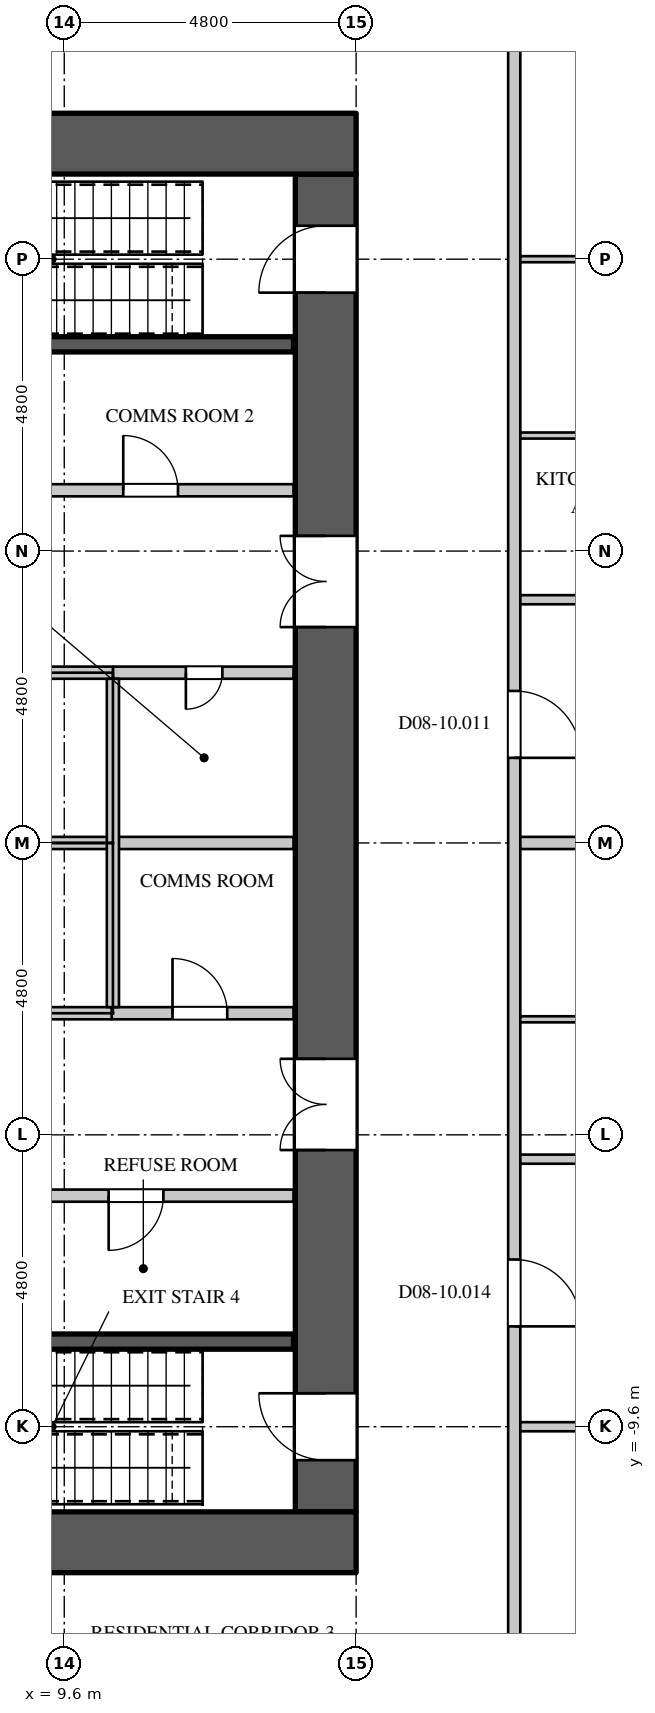
"""IFC4 building model, lengths in metres.
Left out: names, types, materials, properties, quantities, classifications, styles, units other than length and angle.
Written with IfcOpenShell. Run it as: python <this file> out.ifc"""

import sys

from ifc_helpers import new_model, si_unit, direction, frame, frame_2d, origin, place, context, subcontext, project, spatial, rectangle, extrude, element, fill, save


model = new_model("IFC4")
c1 = context("Model", 3, precision=1e-05, world=origin(), true_north=direction((0.0, 1.0)))
c2 = subcontext(c1, "Body", "Model", "MODEL_VIEW")
j1 = project(units=[si_unit("LENGTHUNIT", "METRE"), si_unit("PLANEANGLEUNIT", "RADIAN")], contexts=[c1])
p1 = place(None, origin())
s1 = spatial("IfcSite", under=j1, at=p1, CompositionType="ELEMENT")
p2 = place(p1, origin())
s2 = spatial("IfcBuilding", under=s1, at=p2, CompositionType="ELEMENT")
p3 = place(p2, frame((0.0, 0.0, 38.1)))
s3 = spatial("IfcBuildingStorey", under=s2, at=p3, CompositionType="ELEMENT", Elevation=38.1)
for number, where, z_axis, x_axis in (
    (1, (-14.4, 11.5, 0.0), (0.0, 0.0, 1.0), (1.0, 0.0, 0.0)),
    (2, (-14.4, -11.5, 0.0), (0.0, 0.0, 1.0), (1.0, 0.0, 0.0)),
):
    element("IfcWall", number, at=place(p3, frame(where, z_axis=z_axis, x_axis=x_axis)), inside=s3, PredefinedType="SHEAR", context=c2, shape_type="SweptSolid", body=[
        extrude(rectangle(XDim=28.8, YDim=1.0, at=frame_2d((14.4, 0.0))), origin(), (0.0, 0.0, 1.0), 4.2),
    ])
p4 = place(p3, frame((13.9, -11.0, 0.0), z_axis=(0.0, 0.0, 1.0), x_axis=(0.0, 1.0, 0.0)))
e3 = element("IfcWall", 3, at=p4, inside=s3, PredefinedType="SHEAR", context=c2, shape_type="SweptSolid", body=[
    extrude(rectangle(XDim=22.0, YDim=1.0, at=frame_2d((11.0, 0.0))), origin(), (0.0, 0.0, 1.0), 4.2),
])
p5 = place(p4, frame((20.05, 0.0, 0.0)))
e4 = element("IfcOpeningElement", 4, at=p5, cuts=e3, PredefinedType="OPENING", context=c2, shape_type="SweptSolid", body=[
    extrude(rectangle(XDim=1.1, YDim=2.2, at=frame_2d((0.55, 1.1))), frame((0.0, 0.51, 0.0), z_axis=(0.0, -1.0, 0.0), x_axis=(1.0, 0.0, 0.0)), (0.0, 0.0, 1.0), 1.02),
])
p6 = place(p4, frame((0.85, 0.0, 0.0)))
e5 = element("IfcOpeningElement", 5, at=p6, cuts=e3, PredefinedType="OPENING", context=c2, shape_type="SweptSolid", body=[
    extrude(rectangle(XDim=1.1, YDim=2.2, at=frame_2d((0.55, 1.1))), frame((0.0, 0.51, 0.0), z_axis=(0.0, -1.0, 0.0), x_axis=(1.0, 0.0, 0.0)), (0.0, 0.0, 1.0), 1.02),
])
p7 = place(p4, frame((14.55, 0.0, 0.0)))
e6 = element("IfcOpeningElement", 6, at=p7, cuts=e3, PredefinedType="OPENING", context=c2, shape_type="SweptSolid", body=[
    extrude(rectangle(XDim=1.5, YDim=2.4, at=frame_2d((0.75, 1.2))), frame((0.0, 0.51, 0.0), z_axis=(0.0, -1.0, 0.0), x_axis=(1.0, 0.0, 0.0)), (0.0, 0.0, 1.0), 1.02),
])
p8 = place(p4, frame((5.95, 0.0, 0.0)))
e7 = element("IfcOpeningElement", 7, at=p8, cuts=e3, PredefinedType="OPENING", context=c2, shape_type="SweptSolid", body=[
    extrude(rectangle(XDim=1.5, YDim=2.4, at=frame_2d((0.75, 1.2))), frame((0.0, 0.51, 0.0), z_axis=(0.0, -1.0, 0.0), x_axis=(1.0, 0.0, 0.0)), (0.0, 0.0, 1.0), 1.02),
])
p9 = place(p3, frame((-2.22, -5.8, 0.0), z_axis=(0.0, 0.0, 1.0), x_axis=(1.0, 0.0, 0.0)))
e8 = element("IfcWall", 8, at=p9, inside=s3, PredefinedType="PARTITIONING", context=c2, shape_type="SweptSolid", body=[
    extrude(rectangle(XDim=15.59, YDim=0.2, at=frame_2d((7.795, 0.0))), origin(), (0.0, 0.0, 1.0), 3.95),
])
p10 = place(p9, frame((3.05, 0.0, 0.0)))
e9 = element("IfcOpeningElement", 9, at=p10, cuts=e8, PredefinedType="OPENING", context=c2, shape_type="SweptSolid", body=[
    extrude(rectangle(XDim=0.9, YDim=2.2, at=frame_2d((0.45, 1.1))), frame((0.0, 0.11, 0.0), z_axis=(0.0, -1.0, 0.0), x_axis=(1.0, 0.0, 0.0)), (0.0, 0.0, 1.0), 0.22),
])
p11 = place(p9, frame((8.25, 0.0, 0.0)))
e10 = element("IfcOpeningElement", 10, at=p11, cuts=e8, PredefinedType="OPENING", context=c2, shape_type="SweptSolid", body=[
    extrude(rectangle(XDim=0.9, YDim=2.2, at=frame_2d((0.45, 1.1))), frame((0.0, 0.11, 0.0), z_axis=(0.0, -1.0, 0.0), x_axis=(1.0, 0.0, 0.0)), (0.0, 0.0, 1.0), 0.22),
])
p12 = place(p9, frame((12.55, 0.0, 0.0)))
e11 = element("IfcOpeningElement", 11, at=p12, cuts=e8, PredefinedType="OPENING", context=c2, shape_type="SweptSolid", body=[
    extrude(rectangle(XDim=0.9, YDim=2.2, at=frame_2d((0.45, 1.1))), frame((0.0, 0.11, 0.0), z_axis=(0.0, -1.0, 0.0), x_axis=(1.0, 0.0, 0.0)), (0.0, 0.0, 1.0), 0.22),
])
p13 = place(p3, frame((17.0, -14.5, 0.0), z_axis=(0.0, 0.0, 1.0), x_axis=(0.0, 1.0, 0.0)))
e12 = element("IfcWall", 12, at=p13, inside=s3, PredefinedType="PARTITIONING", context=c2, shape_type="SweptSolid", body=[
    extrude(rectangle(XDim=29.0, YDim=0.2, at=frame_2d((14.5, 0.0))), origin(), (0.0, 0.0, 1.0), 3.95),
])
p14 = place(p13, frame((15.9, 0.0, 0.0)))
e13 = element("IfcOpeningElement", 13, at=p14, cuts=e12, PredefinedType="OPENING", context=c2, shape_type="SweptSolid", body=[
    extrude(rectangle(XDim=1.1, YDim=2.4, at=frame_2d((0.55, 1.2))), frame((0.0, 0.11, 0.0), z_axis=(0.0, -1.0, 0.0), x_axis=(1.0, 0.0, 0.0)), (0.0, 0.0, 1.0), 0.22),
])
p15 = place(p13, frame((6.55, 0.0, 0.0)))
e14 = element("IfcOpeningElement", 14, at=p15, cuts=e12, PredefinedType="OPENING", context=c2, shape_type="SweptSolid", body=[
    extrude(rectangle(XDim=1.1, YDim=2.4, at=frame_2d((0.55, 1.2))), frame((0.0, 0.11, 0.0), z_axis=(0.0, -1.0, 0.0), x_axis=(1.0, 0.0, 0.0)), (0.0, 0.0, 1.0), 0.22),
])
p16 = place(p3, frame((16.02, -18.695, 0.0), z_axis=(0.0, 0.0, 1.0), x_axis=(0.707106781187, 0.707106781187, 0.0)))
e15 = element("IfcWall", 15, at=p16, inside=s3, PredefinedType="PARTITIONING", context=c2, shape_type="SweptSolid", body=[
    extrude(rectangle(XDim=9.663, YDim=0.15, at=frame_2d((4.832, 0.0))), origin(), (0.0, 0.0, 1.0), 3.95),
])
p17 = place(p16, frame((4.1, 0.0, 0.0)))
e16 = element("IfcOpeningElement", 16, at=p17, cuts=e15, PredefinedType="OPENING", context=c2, shape_type="SweptSolid", body=[
    extrude(rectangle(XDim=0.95, YDim=2.2, at=frame_2d((0.475, 1.1))), frame((0.0, 0.085, 0.0), z_axis=(0.0, -1.0, 0.0), x_axis=(1.0, 0.0, 0.0)), (0.0, 0.0, 1.0), 0.17),
])
p18 = place(p3, frame((17.1, -9.6, 0.0), z_axis=(0.0, 0.0, 1.0), x_axis=(1.0, 0.0, 0.0)))
e17 = element("IfcWall", 17, at=p18, inside=s3, PredefinedType="PARTITIONING", context=c2, shape_type="SweptSolid", body=[
    extrude(rectangle(XDim=11.755, YDim=0.15, at=frame_2d((5.877, 0.0))), origin(), (0.0, 0.0, 1.0), 3.95),
])
p19 = place(p18, frame((1.8, 0.0, 0.0)))
e18 = element("IfcOpeningElement", 18, at=p19, cuts=e17, PredefinedType="OPENING", context=c2, shape_type="SweptSolid", body=[
    extrude(rectangle(XDim=0.95, YDim=2.2, at=frame_2d((0.475, 1.1))), frame((0.0, 0.085, 0.0), z_axis=(0.0, -1.0, 0.0), x_axis=(1.0, 0.0, 0.0)), (0.0, 0.0, 1.0), 0.17),
])
p20 = place(p18, frame((7.95, 0.0, 0.0)))
e19 = element("IfcOpeningElement", 19, at=p20, cuts=e17, PredefinedType="OPENING", context=c2, shape_type="SweptSolid", body=[
    extrude(rectangle(XDim=1.5, YDim=2.2, at=frame_2d((0.75, 1.1))), frame((0.0, 0.085, 0.0), z_axis=(0.0, -1.0, 0.0), x_axis=(1.0, 0.0, 0.0)), (0.0, 0.0, 1.0), 0.17),
])
p21 = place(p3, frame((17.1, -5.2, 0.0), z_axis=(0.0, 0.0, 1.0), x_axis=(1.0, 0.0, 0.0)))
e20 = element("IfcWall", 20, at=p21, inside=s3, PredefinedType="PARTITIONING", context=c2, shape_type="SweptSolid", body=[
    extrude(rectangle(XDim=4.625, YDim=0.15, at=frame_2d((2.312, 0.0))), origin(), (0.0, 0.0, 1.0), 3.95),
])
p22 = place(p21, frame((1.85, 0.0, 0.0)))
e21 = element("IfcOpeningElement", 21, at=p22, cuts=e20, PredefinedType="OPENING", context=c2, shape_type="SweptSolid", body=[
    extrude(rectangle(XDim=0.95, YDim=2.2, at=frame_2d((0.475, 1.1))), frame((0.0, 0.085, 0.0), z_axis=(0.0, -1.0, 0.0), x_axis=(1.0, 0.0, 0.0)), (0.0, 0.0, 1.0), 0.17),
])
p23 = place(p3, frame((17.1, 4.0, 0.0), z_axis=(0.0, 0.0, 1.0), x_axis=(1.0, 0.0, 0.0)))
e22 = element("IfcWall", 22, at=p23, inside=s3, PredefinedType="PARTITIONING", context=c2, shape_type="SweptSolid", body=[
    extrude(rectangle(XDim=4.625, YDim=0.15, at=frame_2d((2.312, 0.0))), origin(), (0.0, 0.0, 1.0), 3.95),
])
p24 = place(p23, frame((1.85, 0.0, 0.0)))
e23 = element("IfcOpeningElement", 23, at=p24, cuts=e22, PredefinedType="OPENING", context=c2, shape_type="SweptSolid", body=[
    extrude(rectangle(XDim=0.95, YDim=2.2, at=frame_2d((0.475, 1.1))), frame((0.0, 0.085, 0.0), z_axis=(0.0, -1.0, 0.0), x_axis=(1.0, 0.0, 0.0)), (0.0, 0.0, 1.0), 0.17),
])
p25 = place(p3, frame((17.1, 0.0, 0.0), z_axis=(0.0, 0.0, 1.0), x_axis=(1.0, 0.0, 0.0)))
e24 = element("IfcWall", 24, at=p25, inside=s3, PredefinedType="PARTITIONING", context=c2, shape_type="SweptSolid", body=[
    extrude(rectangle(XDim=11.755, YDim=0.2, at=frame_2d((5.877, 0.0))), origin(), (0.0, 0.0, 1.0), 3.95),
])
p26 = place(p3, frame((8.62, 5.8, 0.0), z_axis=(0.0, 0.0, 1.0), x_axis=(1.0, 0.0, 0.0)))
e25 = element("IfcWall", 25, at=p26, inside=s3, PredefinedType="PARTITIONING", context=c2, shape_type="SweptSolid", body=[
    extrude(rectangle(XDim=4.75, YDim=0.2, at=frame_2d((2.375, 0.0))), origin(), (0.0, 0.0, 1.0), 3.95),
])
p27 = place(p26, frame((1.95, 0.0, 0.0)))
e26 = element("IfcOpeningElement", 26, at=p27, cuts=e25, PredefinedType="OPENING", context=c2, shape_type="SweptSolid", body=[
    extrude(rectangle(XDim=0.9, YDim=2.2, at=frame_2d((0.45, 1.1))), frame((0.0, 0.11, 0.0), z_axis=(0.0, -1.0, 0.0), x_axis=(1.0, 0.0, 0.0)), (0.0, 0.0, 1.0), 0.22),
])
p28 = place(p3, frame((10.38, -2.8, 0.0), z_axis=(0.0, 0.0, 1.0), x_axis=(1.0, 0.0, 0.0)))
e27 = element("IfcWall", 27, at=p28, inside=s3, PredefinedType="PARTITIONING", context=c2, shape_type="SweptSolid", body=[
    extrude(rectangle(XDim=2.99, YDim=0.2, at=frame_2d((1.495, 0.0))), origin(), (0.0, 0.0, 1.0), 3.95),
])
p29 = place(p28, frame((1.0, 0.0, 0.0)))
e28 = element("IfcOpeningElement", 28, at=p29, cuts=e27, PredefinedType="OPENING", context=c2, shape_type="SweptSolid", body=[
    extrude(rectangle(XDim=0.9, YDim=2.2, at=frame_2d((0.45, 1.1))), frame((0.0, 0.11, 0.0), z_axis=(0.0, -1.0, 0.0), x_axis=(1.0, 0.0, 0.0)), (0.0, 0.0, 1.0), 0.22),
])
p30 = place(p3, frame((10.4, 2.8, 0.0), z_axis=(0.0, 0.0, 1.0), x_axis=(1.0, 0.0, 0.0)))
e29 = element("IfcWall", 29, at=p30, inside=s3, PredefinedType="PARTITIONING", context=c2, shape_type="SweptSolid", body=[
    extrude(rectangle(XDim=2.97, YDim=0.2, at=frame_2d((1.485, 0.0))), origin(), (0.0, 0.0, 1.0), 3.95),
])
p31 = place(p30, frame((1.2, 0.0, 0.0)))
e30 = element("IfcOpeningElement", 30, at=p31, cuts=e29, PredefinedType="OPENING", context=c2, shape_type="SweptSolid", body=[
    extrude(rectangle(XDim=0.6, YDim=2.0, at=frame_2d((0.3, 1.0))), frame((0.0, 0.11, 0.0), z_axis=(0.0, -1.0, 0.0), x_axis=(1.0, 0.0, 0.0)), (0.0, 0.0, 1.0), 0.22),
])
p32 = place(p3, frame((10.4, 0.0, 0.0), z_axis=(0.0, 0.0, 1.0), x_axis=(1.0, 0.0, 0.0)))
e31 = element("IfcWall", 31, at=p32, inside=s3, PredefinedType="PARTITIONING", context=c2, shape_type="SweptSolid", body=[
    extrude(rectangle(XDim=2.97, YDim=0.2, at=frame_2d((1.485, 0.0))), origin(), (0.0, 0.0, 1.0), 3.95),
])
p33 = place(p3, frame((-13.37, 0.0, 0.0), z_axis=(0.0, 0.0, 1.0), x_axis=(1.0, 0.0, 0.0)))
e32 = element("IfcWall", 32, at=p33, inside=s3, PredefinedType="PARTITIONING", context=c2, shape_type="SweptSolid", body=[
    extrude(rectangle(XDim=23.77, YDim=0.2, at=frame_2d((11.885, 0.0))), origin(), (0.0, 0.0, 1.0), 3.95),
])
p34 = place(p3, frame((-13.37, 2.8, 0.0), z_axis=(0.0, 0.0, 1.0), x_axis=(1.0, 0.0, 0.0)))
e33 = element("IfcWall", 33, at=p34, inside=s3, PredefinedType="PARTITIONING", context=c2, shape_type="SweptSolid", body=[
    extrude(rectangle(XDim=23.77, YDim=0.2, at=frame_2d((11.885, 0.0))), origin(), (0.0, 0.0, 1.0), 3.95),
])
p35 = place(p34, frame((0.9, 0.0, 0.0)))
e34 = element("IfcOpeningElement", 34, at=p35, cuts=e33, PredefinedType="OPENING", context=c2, shape_type="SweptSolid", body=[
    extrude(rectangle(XDim=1.1, YDim=2.2, at=frame_2d((0.55, 1.1))), frame((0.0, 0.11, 0.0), z_axis=(0.0, -1.0, 0.0), x_axis=(1.0, 0.0, 0.0)), (0.0, 0.0, 1.0), 0.22),
])
p36 = place(p34, frame((3.7, 0.0, 0.0)))
e35 = element("IfcOpeningElement", 35, at=p36, cuts=e33, PredefinedType="OPENING", context=c2, shape_type="SweptSolid", body=[
    extrude(rectangle(XDim=1.1, YDim=2.2, at=frame_2d((0.55, 1.1))), frame((0.0, 0.11, 0.0), z_axis=(0.0, -1.0, 0.0), x_axis=(1.0, 0.0, 0.0)), (0.0, 0.0, 1.0), 0.22),
])
p37 = place(p34, frame((6.3, 0.0, 0.0)))
e36 = element("IfcOpeningElement", 36, at=p37, cuts=e33, PredefinedType="OPENING", context=c2, shape_type="SweptSolid", body=[
    extrude(rectangle(XDim=1.1, YDim=2.2, at=frame_2d((0.55, 1.1))), frame((0.0, 0.11, 0.0), z_axis=(0.0, -1.0, 0.0), x_axis=(1.0, 0.0, 0.0)), (0.0, 0.0, 1.0), 0.22),
])
p38 = place(p34, frame((8.9, 0.0, 0.0)))
e37 = element("IfcOpeningElement", 37, at=p38, cuts=e33, PredefinedType="OPENING", context=c2, shape_type="SweptSolid", body=[
    extrude(rectangle(XDim=1.1, YDim=2.2, at=frame_2d((0.55, 1.1))), frame((0.0, 0.11, 0.0), z_axis=(0.0, -1.0, 0.0), x_axis=(1.0, 0.0, 0.0)), (0.0, 0.0, 1.0), 0.22),
])
p39 = place(p34, frame((11.5, 0.0, 0.0)))
e38 = element("IfcOpeningElement", 38, at=p39, cuts=e33, PredefinedType="OPENING", context=c2, shape_type="SweptSolid", body=[
    extrude(rectangle(XDim=1.1, YDim=2.2, at=frame_2d((0.55, 1.1))), frame((0.0, 0.11, 0.0), z_axis=(0.0, -1.0, 0.0), x_axis=(1.0, 0.0, 0.0)), (0.0, 0.0, 1.0), 0.22),
])
p40 = place(p34, frame((14.1, 0.0, 0.0)))
e39 = element("IfcOpeningElement", 39, at=p40, cuts=e33, PredefinedType="OPENING", context=c2, shape_type="SweptSolid", body=[
    extrude(rectangle(XDim=1.1, YDim=2.2, at=frame_2d((0.55, 1.1))), frame((0.0, 0.11, 0.0), z_axis=(0.0, -1.0, 0.0), x_axis=(1.0, 0.0, 0.0)), (0.0, 0.0, 1.0), 0.22),
])
p41 = place(p34, frame((16.7, 0.0, 0.0)))
e40 = element("IfcOpeningElement", 40, at=p41, cuts=e33, PredefinedType="OPENING", context=c2, shape_type="SweptSolid", body=[
    extrude(rectangle(XDim=1.1, YDim=2.2, at=frame_2d((0.55, 1.1))), frame((0.0, 0.11, 0.0), z_axis=(0.0, -1.0, 0.0), x_axis=(1.0, 0.0, 0.0)), (0.0, 0.0, 1.0), 0.22),
])
p42 = place(p34, frame((19.3, 0.0, 0.0)))
e41 = element("IfcOpeningElement", 41, at=p42, cuts=e33, PredefinedType="OPENING", context=c2, shape_type="SweptSolid", body=[
    extrude(rectangle(XDim=1.1, YDim=2.2, at=frame_2d((0.55, 1.1))), frame((0.0, 0.11, 0.0), z_axis=(0.0, -1.0, 0.0), x_axis=(1.0, 0.0, 0.0)), (0.0, 0.0, 1.0), 0.22),
])
p43 = place(p3, frame((7.82, -2.8, 0.0), z_axis=(0.0, 0.0, 1.0), x_axis=(1.0, 0.0, 0.0)))
e42 = element("IfcWall", 42, at=p43, inside=s3, PredefinedType="PARTITIONING", context=c2, shape_type="SweptSolid", body=[
    extrude(rectangle(XDim=2.56, YDim=0.2, at=frame_2d((1.28, 0.0))), origin(), (0.0, 0.0, 1.0), 3.95),
])
p44 = place(p3, frame((10.4, -2.7, 0.0), z_axis=(0.0, 0.0, 1.0), x_axis=(0.0, 1.0, 0.0)))
e43 = element("IfcWall", 43, at=p44, inside=s3, PredefinedType="PARTITIONING", context=c2, shape_type="SweptSolid", body=[
    extrude(rectangle(XDim=5.4, YDim=0.2, at=frame_2d((2.7, 0.0))), origin(), (0.0, 0.0, 1.0), 3.95),
])
for number, where, z_axis, x_axis in (
    (44, (5.275, -8.2, 0.0), (0.0, 0.0, 1.0), (1.0, 0.0, 0.0)),
    (45, (5.275, 8.2, 0.0), (0.0, 0.0, 1.0), (1.0, 0.0, 0.0)),
):
    element("IfcWall", number, at=place(p3, frame(where, z_axis=z_axis, x_axis=x_axis)), inside=s3, PredefinedType="SHEAR", context=c2, shape_type="SweptSolid", body=[
        extrude(rectangle(XDim=8.095, YDim=0.25, at=frame_2d((4.048, 0.0))), origin(), (0.0, 0.0, 1.0), 3.95),
    ])
for number, where, z_axis, x_axis in (
    (46, (17.1, -2.9, 0.0), (0.0, 0.0, 1.0), (1.0, 0.0, 0.0)),
    (47, (17.1, 6.7, 0.0), (0.0, 0.0, 1.0), (1.0, 0.0, 0.0)),
):
    element("IfcWall", number, at=place(p3, frame(where, z_axis=z_axis, x_axis=x_axis)), inside=s3, PredefinedType="PARTITIONING", context=c2, shape_type="SweptSolid", body=[
        extrude(rectangle(XDim=4.625, YDim=0.1, at=frame_2d((2.312, 0.0))), origin(), (0.0, 0.0, 1.0), 3.95),
    ])
p45 = place(p3, frame((17.1, 9.6, 0.0), z_axis=(0.0, 0.0, 1.0), x_axis=(1.0, 0.0, 0.0)))
e48 = element("IfcWall", 48, at=p45, inside=s3, PredefinedType="PARTITIONING", context=c2, shape_type="SweptSolid", body=[
    extrude(rectangle(XDim=4.7, YDim=0.1, at=frame_2d((2.35, 0.0))), origin(), (0.0, 0.0, 1.0), 3.95),
])
p46 = place(p45, frame((1.85, 0.0, 0.0)))
e49 = element("IfcOpeningElement", 49, at=p46, cuts=e48, PredefinedType="OPENING", context=c2, shape_type="SweptSolid", body=[
    extrude(rectangle(XDim=0.9, YDim=2.2, at=frame_2d((0.45, 1.1))), frame((0.0, 0.06, 0.0), z_axis=(0.0, -1.0, 0.0), x_axis=(1.0, 0.0, 0.0)), (0.0, 0.0, 1.0), 0.12),
])
p47 = place(p31, origin())
e50 = element("IfcDoor", 50, at=p47, inside=s3, OperationType="SINGLE_SWING_RIGHT", PredefinedType="DOOR", context=c2, shape_type="SweptSolid", body=[
    extrude(rectangle(XDim=0.6, YDim=2.0, at=frame_2d((0.3, 1.0))), frame((0.0, 0.025, 0.0), z_axis=(0.0, -1.0, 0.0), x_axis=(1.0, 0.0, 0.0)), (0.0, 0.0, 1.0), 0.05),
])
fill(e30, e50)
p48 = place(p29, origin())
e51 = element("IfcDoor", 51, at=p48, inside=s3, OperationType="SINGLE_SWING_LEFT", PredefinedType="DOOR", context=c2, shape_type="SweptSolid", body=[
    extrude(rectangle(XDim=0.9, YDim=2.2, at=frame_2d((0.45, 1.1))), frame((0.0, 0.025, 0.0), z_axis=(0.0, -1.0, 0.0), x_axis=(1.0, 0.0, 0.0)), (0.0, 0.0, 1.0), 0.05),
])
fill(e28, e51)
p49 = place(p27, origin())
e52 = element("IfcDoor", 52, at=p49, inside=s3, OperationType="SINGLE_SWING_LEFT", PredefinedType="DOOR", context=c2, shape_type="SweptSolid", body=[
    extrude(rectangle(XDim=0.9, YDim=2.2, at=frame_2d((0.45, 1.1))), frame((0.0, 0.025, 0.0), z_axis=(0.0, -1.0, 0.0), x_axis=(1.0, 0.0, 0.0)), (0.0, 0.0, 1.0), 0.05),
])
fill(e26, e52)
p50 = place(p12, origin())
e53 = element("IfcDoor", 53, at=p50, inside=s3, OperationType="SINGLE_SWING_RIGHT", PredefinedType="DOOR", context=c2, shape_type="SweptSolid", body=[
    extrude(rectangle(XDim=0.9, YDim=2.2, at=frame_2d((0.45, 1.1))), frame((0.0, 0.025, 0.0), z_axis=(0.0, -1.0, 0.0), x_axis=(1.0, 0.0, 0.0)), (0.0, 0.0, 1.0), 0.05),
])
fill(e11, e53)
p51 = place(p5, origin())
e54 = element("IfcDoor", 54, at=p51, inside=s3, OperationType="SINGLE_SWING_LEFT", PredefinedType="DOOR", context=c2, shape_type="SweptSolid", body=[
    extrude(rectangle(XDim=1.1, YDim=2.2, at=frame_2d((0.55, 1.1))), frame((0.0, 0.495, 0.0), z_axis=(0.0, -1.0, 0.0), x_axis=(1.0, 0.0, 0.0)), (0.0, 0.0, 1.0), 0.05),
])
fill(e4, e54)
p52 = place(p6, origin())
e55 = element("IfcDoor", 55, at=p52, inside=s3, OperationType="SINGLE_SWING_RIGHT", PredefinedType="DOOR", context=c2, shape_type="SweptSolid", body=[
    extrude(rectangle(XDim=1.1, YDim=2.2, at=frame_2d((0.55, 1.1))), frame((0.0, 0.495, 0.0), z_axis=(0.0, -1.0, 0.0), x_axis=(1.0, 0.0, 0.0)), (0.0, 0.0, 1.0), 0.05),
])
fill(e5, e55)
p53 = place(p7, origin())
e56 = element("IfcDoor", 56, at=p53, inside=s3, OperationType="DOUBLE_DOOR_SINGLE_SWING", PredefinedType="DOOR", context=c2, shape_type="SweptSolid", body=[
    extrude(rectangle(XDim=1.5, YDim=2.4, at=frame_2d((0.75, 1.2))), frame((0.0, 0.495, 0.0), z_axis=(0.0, -1.0, 0.0), x_axis=(1.0, 0.0, 0.0)), (0.0, 0.0, 1.0), 0.05),
])
fill(e6, e56)
p54 = place(p8, origin())
e57 = element("IfcDoor", 57, at=p54, inside=s3, OperationType="DOUBLE_DOOR_SINGLE_SWING", PredefinedType="DOOR", context=c2, shape_type="SweptSolid", body=[
    extrude(rectangle(XDim=1.5, YDim=2.4, at=frame_2d((0.75, 1.2))), frame((0.0, 0.495, 0.0), z_axis=(0.0, -1.0, 0.0), x_axis=(1.0, 0.0, 0.0)), (0.0, 0.0, 1.0), 0.05),
])
fill(e7, e57)
p55 = place(p14, origin())
e58 = element("IfcDoor", 58, at=p55, inside=s3, OperationType="SINGLE_SWING_RIGHT", PredefinedType="DOOR", context=c2, shape_type="SweptSolid", body=[
    extrude(rectangle(XDim=1.1, YDim=2.4, at=frame_2d((0.55, 1.2))), frame((0.0, 0.025, 0.0), z_axis=(0.0, -1.0, 0.0), x_axis=(1.0, 0.0, 0.0)), (0.0, 0.0, 1.0), 0.05),
])
fill(e13, e58)
p56 = place(p15, origin())
e59 = element("IfcDoor", 59, at=p56, inside=s3, OperationType="SINGLE_SWING_RIGHT", PredefinedType="DOOR", context=c2, shape_type="SweptSolid", body=[
    extrude(rectangle(XDim=1.1, YDim=2.4, at=frame_2d((0.55, 1.2))), frame((0.0, 0.025, 0.0), z_axis=(0.0, -1.0, 0.0), x_axis=(1.0, 0.0, 0.0)), (0.0, 0.0, 1.0), 0.05),
])
fill(e14, e59)
save(model, sys.argv[1])
